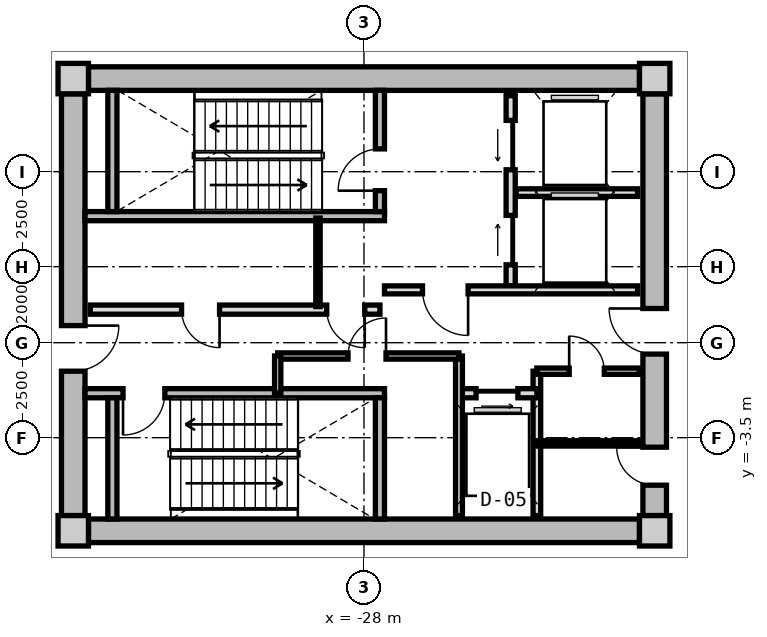
"""IFC4 building model, lengths in metres.
Left out: names, types, materials, properties, quantities, classifications, styles, units other than length and angle.
Written with IfcOpenShell. Run it as: python <this file> out.ifc"""

import sys

from ifc_helpers import new_model, si_unit, direction, frame, frame_2d, origin, origin_2d, place, context, subcontext, project, spatial, rectangle, extrude, source, transform, mapped, element, fill, save


model = new_model("IFC4")
c1 = context("Model", 3, precision=1e-05, world=origin(), true_north=direction((0.0, 1.0)))
c2 = subcontext(c1, "Body", "Model", "MODEL_VIEW")
j1 = project(units=[si_unit("LENGTHUNIT", "METRE"), si_unit("PLANEANGLEUNIT", "RADIAN")], contexts=[c1])
p1 = place(None, origin())
s1 = spatial("IfcSite", under=j1, at=p1, CompositionType="ELEMENT")
p2 = place(p1, origin())
s2 = spatial("IfcBuilding", under=s1, at=p2, CompositionType="ELEMENT")
p3 = place(p2, frame((0.0, 0.0, 186.15)))
s3 = spatial("IfcBuildingStorey", under=s2, at=p3, CompositionType="ELEMENT", Elevation=186.15)
m1 = source(origin(), c2, "Body", "SweptSolid", [
    extrude(rectangle(XDim=0.8, YDim=0.8, at=origin_2d()), origin(), (0.0, 0.0, 1.0), 4.5),
])
for number, where, z_axis, x_axis in (
    (1, (-35.65, -5.95, 0.0), (0.0, 0.0, 1.0), (1.0, 0.0, 0.0)),
    (2, (-20.35, -5.95, 0.0), (0.0, 0.0, 1.0), (1.0, 0.0, 0.0)),
    (3, (-20.35, 5.95, 0.0), (0.0, 0.0, 1.0), (1.0, 0.0, 0.0)),
    (4, (-35.65, 5.95, 0.0), (0.0, 0.0, 1.0), (1.0, 0.0, 0.0)),
):
    element("IfcColumn", number, at=place(p3, frame(where, z_axis=z_axis, x_axis=x_axis)), inside=s3, PredefinedType="COLUMN", context=c2, shape_type="MappedRepresentation", body=[
        mapped(m1, transform((0.0, 0.0, 0.0), x_axis=(1.0, 0.0, 0.0), y_axis=(0.0, 1.0, 0.0), z_axis=(0.0, 0.0, 1.0), scale=1.0)),
    ])
m2 = source(origin(), c2, "Body", "SweptSolid", [
    extrude(rectangle(XDim=14.5, YDim=0.62, at=frame_2d((7.25, 0.0))), origin(), (0.0, 0.0, 1.0), 4.08),
])
for number, where, z_axis, x_axis in (
    (5, (-35.25, 5.95, 0.0), (0.0, 0.0, 1.0), (1.0, 0.0, 0.0)),
    (6, (-20.75, -5.95, 0.0), (0.0, 0.0, 1.0), (-1.0, 0.0, 0.0)),
):
    element("IfcWall", number, at=place(p3, frame(where, z_axis=z_axis, x_axis=x_axis)), inside=s3, PredefinedType="SHEAR", context=c2, shape_type="MappedRepresentation", body=[
        mapped(m2, transform((0.0, 0.0, 0.0), x_axis=(1.0, 0.0, 0.0), y_axis=(0.0, 1.0, 0.0), z_axis=(0.0, 0.0, 1.0), scale=1.0)),
    ])
m3 = source(origin(), c2, "Body", "SweptSolid", [
    extrude(rectangle(XDim=11.1, YDim=0.62, at=frame_2d((5.55, 0.0))), origin(), (0.0, 0.0, 1.0), 4.08),
])
p4 = place(p3, frame((-35.65, -5.55, 0.0), z_axis=(0.0, 0.0, 1.0), x_axis=(0.0, 1.0, 0.0)))
e7 = element("IfcWall", 7, at=p4, inside=s3, PredefinedType="SHEAR", context=c2, shape_type="MappedRepresentation", body=[
    mapped(m3, transform((0.0, 0.0, 0.0), x_axis=(1.0, 0.0, 0.0), y_axis=(0.0, 1.0, 0.0), z_axis=(0.0, 0.0, 1.0), scale=1.0)),
])
p5 = place(p4, frame((3.8, 0.0, 0.0)))
e8 = element("IfcOpeningElement", 8, at=p5, cuts=e7, PredefinedType="OPENING", context=c2, shape_type="SweptSolid", body=[
    extrude(rectangle(XDim=1.2, YDim=2.15, at=frame_2d((0.6, 1.075))), frame((0.0, 0.32, 0.0), z_axis=(0.0, -1.0, 0.0), x_axis=(1.0, 0.0, 0.0)), (0.0, 0.0, 1.0), 0.64),
])
p6 = place(p3, frame((-20.35, 5.55, 0.0), z_axis=(0.0, 0.0, 1.0), x_axis=(0.0, -1.0, 0.0)))
e9 = element("IfcWall", 9, at=p6, inside=s3, PredefinedType="SHEAR", context=c2, shape_type="MappedRepresentation", body=[
    mapped(m3, transform((0.0, 0.0, 0.0), x_axis=(1.0, 0.0, 0.0), y_axis=(0.0, 1.0, 0.0), z_axis=(0.0, 0.0, 1.0), scale=1.0)),
])
p7 = place(p6, frame((5.65, 0.0, 0.0)))
e10 = element("IfcOpeningElement", 10, at=p7, cuts=e9, PredefinedType="OPENING", context=c2, shape_type="SweptSolid", body=[
    extrude(rectangle(XDim=1.2, YDim=2.15, at=frame_2d((0.6, 1.075))), frame((0.0, 0.32, 0.0), z_axis=(0.0, -1.0, 0.0), x_axis=(1.0, 0.0, 0.0)), (0.0, 0.0, 1.0), 0.64),
])
p8 = place(p6, frame((9.3, 0.0, 0.0)))
e11 = element("IfcOpeningElement", 11, at=p8, cuts=e9, PredefinedType="OPENING", context=c2, shape_type="SweptSolid", body=[
    extrude(rectangle(XDim=1.0, YDim=2.1, at=frame_2d((0.5, 1.05))), frame((0.0, 0.32, 0.0), z_axis=(0.0, -1.0, 0.0), x_axis=(1.0, 0.0, 0.0)), (0.0, 0.0, 1.0), 0.64),
])
m4 = source(origin(), c2, "Body", "SweptSolid", [
    extrude(rectangle(XDim=7.88, YDim=0.24, at=frame_2d((3.94, 0.0))), origin(), (0.0, 0.0, 1.0), 4.08),
])
p9 = place(p3, frame((-35.34, 2.33, 0.0), z_axis=(0.0, 0.0, 1.0), x_axis=(1.0, 0.0, 0.0)))
e12 = element("IfcWall", 12, at=p9, inside=s3, PredefinedType="PARTITIONING", context=c2, shape_type="MappedRepresentation", body=[
    mapped(m4, transform((0.0, 0.0, 0.0), x_axis=(1.0, 0.0, 0.0), y_axis=(0.0, 1.0, 0.0), z_axis=(0.0, 0.0, 1.0), scale=1.0)),
])
m5 = source(origin(), c2, "Body", "SweptSolid", [
    extrude(rectangle(XDim=3.19, YDim=0.24, at=frame_2d((1.595, 0.0))), origin(), (0.0, 0.0, 1.0), 4.08),
])
p10 = place(p3, frame((-34.62, 2.45, 0.0), z_axis=(0.0, 0.0, 1.0), x_axis=(0.0, 1.0, 0.0)))
e13 = element("IfcWall", 13, at=p10, inside=s3, PredefinedType="PARTITIONING", context=c2, shape_type="MappedRepresentation", body=[
    mapped(m5, transform((0.0, 0.0, 0.0), x_axis=(1.0, 0.0, 0.0), y_axis=(0.0, 1.0, 0.0), z_axis=(0.0, 0.0, 1.0), scale=1.0)),
])
p11 = place(p3, frame((-27.58, 2.45, 0.0), z_axis=(0.0, 0.0, 1.0), x_axis=(0.0, 1.0, 0.0)))
e14 = element("IfcWall", 14, at=p11, inside=s3, PredefinedType="PARTITIONING", context=c2, shape_type="MappedRepresentation", body=[
    mapped(m5, transform((0.0, 0.0, 0.0), x_axis=(1.0, 0.0, 0.0), y_axis=(0.0, 1.0, 0.0), z_axis=(0.0, 0.0, 1.0), scale=1.0)),
])
p12 = place(p11, frame((0.55, 0.0, 0.0)))
e15 = element("IfcOpeningElement", 15, at=p12, cuts=e14, PredefinedType="OPENING", context=c2, shape_type="SweptSolid", body=[
    extrude(rectangle(XDim=1.1, YDim=2.15, at=frame_2d((0.55, 1.075))), frame((0.0, 0.13, 0.0), z_axis=(0.0, -1.0, 0.0), x_axis=(1.0, 0.0, 0.0)), (0.0, 0.0, 1.0), 0.26),
])
p13 = place(p3, frame((-35.34, -2.33, 0.0), z_axis=(0.0, 0.0, 1.0), x_axis=(1.0, 0.0, 0.0)))
e16 = element("IfcWall", 16, at=p13, inside=s3, PredefinedType="PARTITIONING", context=c2, shape_type="MappedRepresentation", body=[
    mapped(m4, transform((0.0, 0.0, 0.0), x_axis=(1.0, 0.0, 0.0), y_axis=(0.0, 1.0, 0.0), z_axis=(0.0, 0.0, 1.0), scale=1.0)),
])
p14 = place(p13, frame((1.0, 0.0, 0.0)))
e17 = element("IfcOpeningElement", 17, at=p14, cuts=e16, PredefinedType="OPENING", context=c2, shape_type="SweptSolid", body=[
    extrude(rectangle(XDim=1.1, YDim=2.15, at=frame_2d((0.55, 1.075))), frame((0.0, 0.13, 0.0), z_axis=(0.0, -1.0, 0.0), x_axis=(1.0, 0.0, 0.0)), (0.0, 0.0, 1.0), 0.26),
])
for number, where, z_axis, x_axis in (
    (18, (-34.62, -5.64, 0.0), (0.0, 0.0, 1.0), (0.0, 1.0, 0.0)),
    (19, (-27.58, -5.64, 0.0), (0.0, 0.0, 1.0), (0.0, 1.0, 0.0)),
):
    element("IfcWall", number, at=place(p3, frame(where, z_axis=z_axis, x_axis=x_axis)), inside=s3, PredefinedType="PARTITIONING", context=c2, shape_type="MappedRepresentation", body=[
        mapped(m5, transform((0.0, 0.0, 0.0), x_axis=(1.0, 0.0, 0.0), y_axis=(0.0, 1.0, 0.0), z_axis=(0.0, 0.0, 1.0), scale=1.0)),
    ])
m6 = source(origin(), c2, "Body", "SweptSolid", [
    extrude(rectangle(XDim=5.0, YDim=0.24, at=frame_2d((2.5, 0.0))), origin(), (0.0, 0.0, 1.0), 4.065),
])
p15 = place(p3, frame((-24.14, 0.5, 0.0), z_axis=(0.0, 0.0, 1.0), x_axis=(0.0, 1.0, 0.0)))
e20 = element("IfcWall", 20, at=p15, inside=s3, PredefinedType="PARTITIONING", context=c2, shape_type="MappedRepresentation", body=[
    mapped(m6, transform((0.0, 0.0, 0.0), x_axis=(1.0, 0.0, 0.0), y_axis=(0.0, 1.0, 0.0), z_axis=(0.0, 0.0, 1.0), scale=1.0)),
])
p16 = place(p15, frame((3.05, 0.0, 0.0)))
e21 = element("IfcOpeningElement", 21, at=p16, cuts=e20, PredefinedType="OPENING", context=c2, shape_type="SweptSolid", body=[
    extrude(rectangle(XDim=1.3, YDim=2.2, at=frame_2d((0.65, 1.1))), frame((0.0, 0.13, 0.0), z_axis=(0.0, -1.0, 0.0), x_axis=(1.0, 0.0, 0.0)), (0.0, 0.0, 1.0), 0.26),
])
p17 = place(p15, frame((0.55, 0.0, 0.0)))
e22 = element("IfcOpeningElement", 22, at=p17, cuts=e20, PredefinedType="OPENING", context=c2, shape_type="SweptSolid", body=[
    extrude(rectangle(XDim=1.3, YDim=2.2, at=frame_2d((0.65, 1.1))), frame((0.0, 0.13, 0.0), z_axis=(0.0, -1.0, 0.0), x_axis=(1.0, 0.0, 0.0)), (0.0, 0.0, 1.0), 0.26),
])
m7 = source(origin(), c2, "Body", "SweptSolid", [
    extrude(rectangle(XDim=3.2, YDim=0.2, at=frame_2d((1.6, 0.0))), origin(), (0.0, 0.0, 1.0), 4.065),
])
p18 = place(p3, frame((-24.0, 2.95, 0.0), z_axis=(0.0, 0.0, 1.0), x_axis=(1.0, 0.0, 0.0)))
e23 = element("IfcWall", 23, at=p18, inside=s3, PredefinedType="PARTITIONING", context=c2, shape_type="MappedRepresentation", body=[
    mapped(m7, transform((0.0, 0.0, 0.0), x_axis=(1.0, 0.0, 0.0), y_axis=(0.0, 1.0, 0.0), z_axis=(0.0, 0.0, 1.0), scale=1.0)),
])
m8 = source(origin(), c2, "Body", "SweptSolid", [
    extrude(rectangle(XDim=6.66, YDim=0.21, at=frame_2d((3.33, 0.0))), origin(), (0.0, 0.0, 1.0), 4.065),
])
p19 = place(p3, frame((-27.46, 0.39, 0.0), z_axis=(0.0, 0.0, 1.0), x_axis=(1.0, 0.0, 0.0)))
e24 = element("IfcWall", 24, at=p19, inside=s3, PredefinedType="PARTITIONING", context=c2, shape_type="MappedRepresentation", body=[
    mapped(m8, transform((0.0, 0.0, 0.0), x_axis=(1.0, 0.0, 0.0), y_axis=(0.0, 1.0, 0.0), z_axis=(0.0, 0.0, 1.0), scale=1.0)),
])
p20 = place(p19, frame((1.0, 0.0, 0.0)))
e25 = element("IfcOpeningElement", 25, at=p20, cuts=e24, PredefinedType="OPENING", context=c2, shape_type="SweptSolid", body=[
    extrude(rectangle(XDim=1.2, YDim=2.15, at=frame_2d((0.6, 1.075))), frame((0.0, 0.115, 0.0), z_axis=(0.0, -1.0, 0.0), x_axis=(1.0, 0.0, 0.0)), (0.0, 0.0, 1.0), 0.23),
])
m9 = source(origin(), c2, "Body", "SweptSolid", [
    extrude(rectangle(XDim=7.62, YDim=0.24, at=frame_2d((3.81, 0.0))), origin(), (0.0, 0.0, 1.0), 4.065),
])
p21 = place(p3, frame((-35.2, -0.13, 0.0), z_axis=(0.0, 0.0, 1.0), x_axis=(1.0, 0.0, 0.0)))
e26 = element("IfcWall", 26, at=p21, inside=s3, PredefinedType="PARTITIONING", context=c2, shape_type="MappedRepresentation", body=[
    mapped(m9, transform((0.0, 0.0, 0.0), x_axis=(1.0, 0.0, 0.0), y_axis=(0.0, 1.0, 0.0), z_axis=(0.0, 0.0, 1.0), scale=1.0)),
])
p22 = place(p21, frame((6.22, 0.0, 0.0)))
e27 = element("IfcOpeningElement", 27, at=p22, cuts=e26, PredefinedType="OPENING", context=c2, shape_type="SweptSolid", body=[
    extrude(rectangle(XDim=1.0, YDim=2.1, at=frame_2d((0.5, 1.05))), frame((0.0, 0.13, 0.0), z_axis=(0.0, -1.0, 0.0), x_axis=(1.0, 0.0, 0.0)), (0.0, 0.0, 1.0), 0.26),
])
p23 = place(p21, frame((2.4, 0.0, 0.0)))
e28 = element("IfcOpeningElement", 28, at=p23, cuts=e26, PredefinedType="OPENING", context=c2, shape_type="SweptSolid", body=[
    extrude(rectangle(XDim=1.0, YDim=2.1, at=frame_2d((0.5, 1.05))), frame((0.0, 0.13, 0.0), z_axis=(0.0, -1.0, 0.0), x_axis=(1.0, 0.0, 0.0)), (0.0, 0.0, 1.0), 0.26),
])
m10 = source(origin(), c2, "Body", "SweptSolid", [
    extrude(rectangle(XDim=2.33, YDim=0.115, at=frame_2d((1.165, 0.0))), origin(), (0.0, 0.0, 1.0), 4.065),
])
p24 = place(p3, frame((-29.21, -0.05, 0.0), z_axis=(0.0, 0.0, 1.0), x_axis=(0.0, 1.0, 0.0)))
e29 = element("IfcWall", 29, at=p24, inside=s3, PredefinedType="PARTITIONING", context=c2, shape_type="MappedRepresentation", body=[
    mapped(m10, transform((0.0, 0.0, 0.0), x_axis=(1.0, 0.0, 0.0), y_axis=(0.0, 1.0, 0.0), z_axis=(0.0, 0.0, 1.0), scale=1.0)),
])
m11 = source(origin(), c2, "Body", "SweptSolid", [
    extrude(rectangle(XDim=3.8, YDim=0.2, at=frame_2d((1.9, 0.0))), origin(), (0.0, 0.0, 1.0), 4.065),
])
p25 = place(p3, frame((-23.45, -5.55, 0.0), z_axis=(0.0, 0.0, 1.0), x_axis=(0.0, 1.0, 0.0)))
e30 = element("IfcWall", 30, at=p25, inside=s3, PredefinedType="PARTITIONING", context=c2, shape_type="MappedRepresentation", body=[
    mapped(m11, transform((0.0, 0.0, 0.0), x_axis=(1.0, 0.0, 0.0), y_axis=(0.0, 1.0, 0.0), z_axis=(0.0, 0.0, 1.0), scale=1.0)),
])
m12 = source(origin(), c2, "Body", "SweptSolid", [
    extrude(rectangle(XDim=2.05, YDim=0.24, at=frame_2d((1.025, 0.0))), origin(), (0.0, 0.0, 1.0), 4.065),
])
p26 = place(p3, frame((-25.5, -2.33, 0.0), z_axis=(0.0, 0.0, 1.0), x_axis=(1.0, 0.0, 0.0)))
e31 = element("IfcWall", 31, at=p26, inside=s3, PredefinedType="PARTITIONING", context=c2, shape_type="MappedRepresentation", body=[
    mapped(m12, transform((0.0, 0.0, 0.0), x_axis=(1.0, 0.0, 0.0), y_axis=(0.0, 1.0, 0.0), z_axis=(0.0, 0.0, 1.0), scale=1.0)),
])
p27 = place(p26, frame((0.45, 0.0, 0.0)))
e32 = element("IfcOpeningElement", 32, at=p27, cuts=e31, PredefinedType="OPENING", context=c2, shape_type="SweptSolid", body=[
    extrude(rectangle(XDim=1.1, YDim=2.2, at=frame_2d((0.55, 1.1))), frame((0.0, 0.13, 0.0), z_axis=(0.0, -1.0, 0.0), x_axis=(1.0, 0.0, 0.0)), (0.0, 0.0, 1.0), 0.26),
])
m13 = source(origin(), c2, "Body", "SweptSolid", [
    extrude(rectangle(XDim=4.2, YDim=0.18, at=frame_2d((2.1, 0.0))), origin(), (0.0, 0.0, 1.0), 4.065),
])
p28 = place(p3, frame((-25.5, -5.55, 0.0), z_axis=(0.0, 0.0, 1.0), x_axis=(0.0, 1.0, 0.0)))
e33 = element("IfcWall", 33, at=p28, inside=s3, PredefinedType="PARTITIONING", context=c2, shape_type="MappedRepresentation", body=[
    mapped(m13, transform((0.0, 0.0, 0.0), x_axis=(1.0, 0.0, 0.0), y_axis=(0.0, 1.0, 0.0), z_axis=(0.0, 0.0, 1.0), scale=1.0)),
])
m14 = source(origin(), c2, "Body", "SweptSolid", [
    extrude(rectangle(XDim=4.77, YDim=0.165, at=frame_2d((2.385, 0.0))), origin(), (0.0, 0.0, 1.0), 4.065),
])
p29 = place(p3, frame((-30.27, -1.35, 0.0), z_axis=(0.0, 0.0, 1.0), x_axis=(1.0, 0.0, 0.0)))
e34 = element("IfcWall", 34, at=p29, inside=s3, PredefinedType="PARTITIONING", context=c2, shape_type="MappedRepresentation", body=[
    mapped(m14, transform((0.0, 0.0, 0.0), x_axis=(1.0, 0.0, 0.0), y_axis=(0.0, 1.0, 0.0), z_axis=(0.0, 0.0, 1.0), scale=1.0)),
])
p30 = place(p29, frame((1.85, 0.0, 0.0)))
e35 = element("IfcOpeningElement", 35, at=p30, cuts=e34, PredefinedType="OPENING", context=c2, shape_type="SweptSolid", body=[
    extrude(rectangle(XDim=1.0, YDim=2.1, at=frame_2d((0.5, 1.05))), frame((0.0, 0.093, 0.0), z_axis=(0.0, -1.0, 0.0), x_axis=(1.0, 0.0, 0.0)), (0.0, 0.0, 1.0), 0.185),
])
m15 = source(origin(), c2, "Body", "SweptSolid", [
    extrude(rectangle(XDim=0.98, YDim=0.165, at=frame_2d((0.49, 0.0))), origin(), (0.0, 0.0, 1.0), 4.065),
])
p31 = place(p3, frame((-30.27, -2.33, 0.0), z_axis=(0.0, 0.0, 1.0), x_axis=(0.0, 1.0, 0.0)))
e36 = element("IfcWall", 36, at=p31, inside=s3, PredefinedType="PARTITIONING", context=c2, shape_type="MappedRepresentation", body=[
    mapped(m15, transform((0.0, 0.0, 0.0), x_axis=(1.0, 0.0, 0.0), y_axis=(0.0, 1.0, 0.0), z_axis=(0.0, 0.0, 1.0), scale=1.0)),
])
m16 = source(origin(), c2, "Body", "SweptSolid", [
    extrude(rectangle(XDim=2.7, YDim=0.165, at=frame_2d((1.35, 0.0))), origin(), (0.0, 0.0, 1.0), 4.065),
])
p32 = place(p3, frame((-23.45, -1.75, 0.0), z_axis=(0.0, 0.0, 1.0), x_axis=(1.0, 0.0, 0.0)))
e37 = element("IfcWall", 37, at=p32, inside=s3, PredefinedType="PARTITIONING", context=c2, shape_type="MappedRepresentation", body=[
    mapped(m16, transform((0.0, 0.0, 0.0), x_axis=(1.0, 0.0, 0.0), y_axis=(0.0, 1.0, 0.0), z_axis=(0.0, 0.0, 1.0), scale=1.0)),
])
p33 = place(p32, frame((0.85, 0.0, 0.0)))
e38 = element("IfcOpeningElement", 38, at=p33, cuts=e37, PredefinedType="OPENING", context=c2, shape_type="SweptSolid", body=[
    extrude(rectangle(XDim=0.925, YDim=2.1, at=frame_2d((0.462, 1.05))), frame((0.0, 0.093, 0.0), z_axis=(0.0, -1.0, 0.0), x_axis=(1.0, 0.0, 0.0)), (0.0, 0.0, 1.0), 0.185),
])
m17 = source(origin(), c2, "Body", "SweptSolid", [
    extrude(rectangle(XDim=2.7, YDim=0.14, at=frame_2d((1.35, 0.0))), origin(), (0.0, 0.0, 1.0), 4.065),
])
p34 = place(p3, frame((-23.45, -3.65, 0.0), z_axis=(0.0, 0.0, 1.0), x_axis=(1.0, 0.0, 0.0)))
e39 = element("IfcWall", 39, at=p34, inside=s3, PredefinedType="PARTITIONING", context=c2, shape_type="MappedRepresentation", body=[
    mapped(m17, transform((0.0, 0.0, 0.0), x_axis=(1.0, 0.0, 0.0), y_axis=(0.0, 1.0, 0.0), z_axis=(0.0, 0.0, 1.0), scale=1.0)),
])
m18 = source(origin(), c2, "Body", "SweptSolid", [
    extrude(rectangle(XDim=1.1, YDim=2.15, at=frame_2d((0.55, 1.075))), frame((0.0, 0.025, 0.0), z_axis=(0.0, -1.0, 0.0), x_axis=(1.0, 0.0, 0.0)), (0.0, 0.0, 1.0), 0.05),
])
p35 = place(p12, origin())
e40 = element("IfcDoor", 40, at=p35, inside=s3, OperationType="SINGLE_SWING_LEFT", PredefinedType="DOOR", context=c2, shape_type="MappedRepresentation", body=[
    mapped(m18, transform((0.0, 0.0, 0.0), x_axis=(1.0, 0.0, 0.0), y_axis=(0.0, 1.0, 0.0), z_axis=(0.0, 0.0, 1.0), scale=1.0)),
])
fill(e15, e40)
p36 = place(p14, frame((1.1, 0.0, 0.0), z_axis=(0.0, 0.0, 1.0), x_axis=(-1.0, 0.0, 0.0)))
e41 = element("IfcDoor", 41, at=p36, inside=s3, OperationType="SINGLE_SWING_RIGHT", PredefinedType="DOOR", context=c2, shape_type="MappedRepresentation", body=[
    mapped(m18, transform((0.0, 0.0, 0.0), x_axis=(1.0, 0.0, 0.0), y_axis=(0.0, 1.0, 0.0), z_axis=(0.0, 0.0, 1.0), scale=1.0)),
])
fill(e17, e41)
m19 = source(origin(), c2, "Body", "SweptSolid", [
    extrude(rectangle(XDim=1.3, YDim=2.2, at=frame_2d((0.65, 1.1))), frame((0.0, 0.025, 0.0), z_axis=(0.0, -1.0, 0.0), x_axis=(1.0, 0.0, 0.0)), (0.0, 0.0, 1.0), 0.05),
])
p37 = place(p16, origin())
e42 = element("IfcDoor", 42, at=p37, inside=s3, OperationType="SLIDING_TO_LEFT", PredefinedType="DOOR", context=c2, shape_type="MappedRepresentation", body=[
    mapped(m19, transform((0.0, 0.0, 0.0), x_axis=(1.0, 0.0, 0.0), y_axis=(0.0, 1.0, 0.0), z_axis=(0.0, 0.0, 1.0), scale=1.0)),
])
fill(e21, e42)
p38 = place(p17, origin())
e43 = element("IfcDoor", 43, at=p38, inside=s3, OperationType="SLIDING_TO_RIGHT", PredefinedType="DOOR", context=c2, shape_type="MappedRepresentation", body=[
    mapped(m19, transform((0.0, 0.0, 0.0), x_axis=(1.0, 0.0, 0.0), y_axis=(0.0, 1.0, 0.0), z_axis=(0.0, 0.0, 1.0), scale=1.0)),
])
fill(e22, e43)
m20 = source(origin(), c2, "Body", "SweptSolid", [
    extrude(rectangle(XDim=1.2, YDim=2.15, at=frame_2d((0.6, 1.075))), frame((0.0, 0.025, 0.0), z_axis=(0.0, -1.0, 0.0), x_axis=(1.0, 0.0, 0.0)), (0.0, 0.0, 1.0), 0.05),
])
p39 = place(p20, frame((1.2, 0.0, 0.0), z_axis=(0.0, 0.0, 1.0), x_axis=(-1.0, 0.0, 0.0)))
e44 = element("IfcDoor", 44, at=p39, inside=s3, OperationType="SINGLE_SWING_LEFT", PredefinedType="DOOR", context=c2, shape_type="MappedRepresentation", body=[
    mapped(m20, transform((0.0, 0.0, 0.0), x_axis=(1.0, 0.0, 0.0), y_axis=(0.0, 1.0, 0.0), z_axis=(0.0, 0.0, 1.0), scale=1.0)),
])
fill(e25, e44)
p40 = place(p5, frame((1.2, 0.0, 0.0), z_axis=(0.0, 0.0, 1.0), x_axis=(-1.0, 0.0, 0.0)))
e45 = element("IfcDoor", 45, at=p40, inside=s3, OperationType="SINGLE_SWING_LEFT", PredefinedType="DOOR", context=c2, shape_type="MappedRepresentation", body=[
    mapped(m20, transform((0.0, 0.0, 0.0), x_axis=(1.0, 0.0, 0.0), y_axis=(0.0, 1.0, 0.0), z_axis=(0.0, 0.0, 1.0), scale=1.0)),
])
fill(e8, e45)
p41 = place(p7, frame((1.2, 0.0, 0.0), z_axis=(0.0, 0.0, 1.0), x_axis=(-1.0, 0.0, 0.0)))
e46 = element("IfcDoor", 46, at=p41, inside=s3, OperationType="SINGLE_SWING_RIGHT", PredefinedType="DOOR", context=c2, shape_type="MappedRepresentation", body=[
    mapped(m20, transform((0.0, 0.0, 0.0), x_axis=(1.0, 0.0, 0.0), y_axis=(0.0, 1.0, 0.0), z_axis=(0.0, 0.0, 1.0), scale=1.0)),
])
fill(e10, e46)
m21 = source(origin(), c2, "Body", "SweptSolid", [
    extrude(rectangle(XDim=1.0, YDim=2.1, at=frame_2d((0.5, 1.05))), frame((0.0, 0.025, 0.0), z_axis=(0.0, -1.0, 0.0), x_axis=(1.0, 0.0, 0.0)), (0.0, 0.0, 1.0), 0.05),
])
p42 = place(p22, frame((1.0, 0.0, 0.0), z_axis=(0.0, 0.0, 1.0), x_axis=(-1.0, 0.0, 0.0)))
e47 = element("IfcDoor", 47, at=p42, inside=s3, OperationType="SINGLE_SWING_LEFT", PredefinedType="DOOR", context=c2, shape_type="MappedRepresentation", body=[
    mapped(m21, transform((0.0, 0.0, 0.0), x_axis=(1.0, 0.0, 0.0), y_axis=(0.0, 1.0, 0.0), z_axis=(0.0, 0.0, 1.0), scale=1.0)),
])
fill(e27, e47)
p43 = place(p23, frame((1.0, 0.0, 0.0), z_axis=(0.0, 0.0, 1.0), x_axis=(-1.0, 0.0, 0.0)))
e48 = element("IfcDoor", 48, at=p43, inside=s3, OperationType="SINGLE_SWING_LEFT", PredefinedType="DOOR", context=c2, shape_type="MappedRepresentation", body=[
    mapped(m21, transform((0.0, 0.0, 0.0), x_axis=(1.0, 0.0, 0.0), y_axis=(0.0, 1.0, 0.0), z_axis=(0.0, 0.0, 1.0), scale=1.0)),
])
fill(e28, e48)
m22 = source(origin(), c2, "Body", "SweptSolid", [
    extrude(rectangle(XDim=1.1, YDim=2.2, at=frame_2d((0.55, 1.1))), frame((0.0, 0.025, 0.0), z_axis=(0.0, -1.0, 0.0), x_axis=(1.0, 0.0, 0.0)), (0.0, 0.0, 1.0), 0.05),
])
p44 = place(p27, frame((1.1, 0.0, 0.0), z_axis=(0.0, 0.0, 1.0), x_axis=(-1.0, 0.0, 0.0)))
e49 = element("IfcDoor", 49, at=p44, inside=s3, OperationType="SLIDING_TO_RIGHT", PredefinedType="DOOR", context=c2, shape_type="MappedRepresentation", body=[
    mapped(m22, transform((0.0, 0.0, 0.0), x_axis=(1.0, 0.0, 0.0), y_axis=(0.0, 1.0, 0.0), z_axis=(0.0, 0.0, 1.0), scale=1.0)),
])
fill(e32, e49)
p45 = place(p30, origin())
e50 = element("IfcDoor", 50, at=p45, inside=s3, OperationType="SINGLE_SWING_RIGHT", PredefinedType="DOOR", context=c2, shape_type="MappedRepresentation", body=[
    mapped(m21, transform((0.0, 0.0, 0.0), x_axis=(1.0, 0.0, 0.0), y_axis=(0.0, 1.0, 0.0), z_axis=(0.0, 0.0, 1.0), scale=1.0)),
])
fill(e35, e50)
m23 = source(origin(), c2, "Body", "SweptSolid", [
    extrude(rectangle(XDim=0.925, YDim=2.1, at=frame_2d((0.462, 1.05))), frame((0.0, 0.025, 0.0), z_axis=(0.0, -1.0, 0.0), x_axis=(1.0, 0.0, 0.0)), (0.0, 0.0, 1.0), 0.05),
])
p46 = place(p33, origin())
e51 = element("IfcDoor", 51, at=p46, inside=s3, OperationType="SINGLE_SWING_LEFT", PredefinedType="DOOR", context=c2, shape_type="MappedRepresentation", body=[
    mapped(m23, transform((0.0, 0.0, 0.0), x_axis=(1.0, 0.0, 0.0), y_axis=(0.0, 1.0, 0.0), z_axis=(0.0, 0.0, 1.0), scale=1.0)),
])
fill(e38, e51)
p47 = place(p8, frame((1.0, 0.0, 0.0), z_axis=(0.0, 0.0, 1.0), x_axis=(-1.0, 0.0, 0.0)))
e52 = element("IfcDoor", 52, at=p47, inside=s3, OperationType="SINGLE_SWING_RIGHT", PredefinedType="DOOR", context=c2, shape_type="MappedRepresentation", body=[
    mapped(m21, transform((0.0, 0.0, 0.0), x_axis=(1.0, 0.0, 0.0), y_axis=(0.0, 1.0, 0.0), z_axis=(0.0, 0.0, 1.0), scale=1.0)),
])
fill(e11, e52)
save(model, sys.argv[1])
